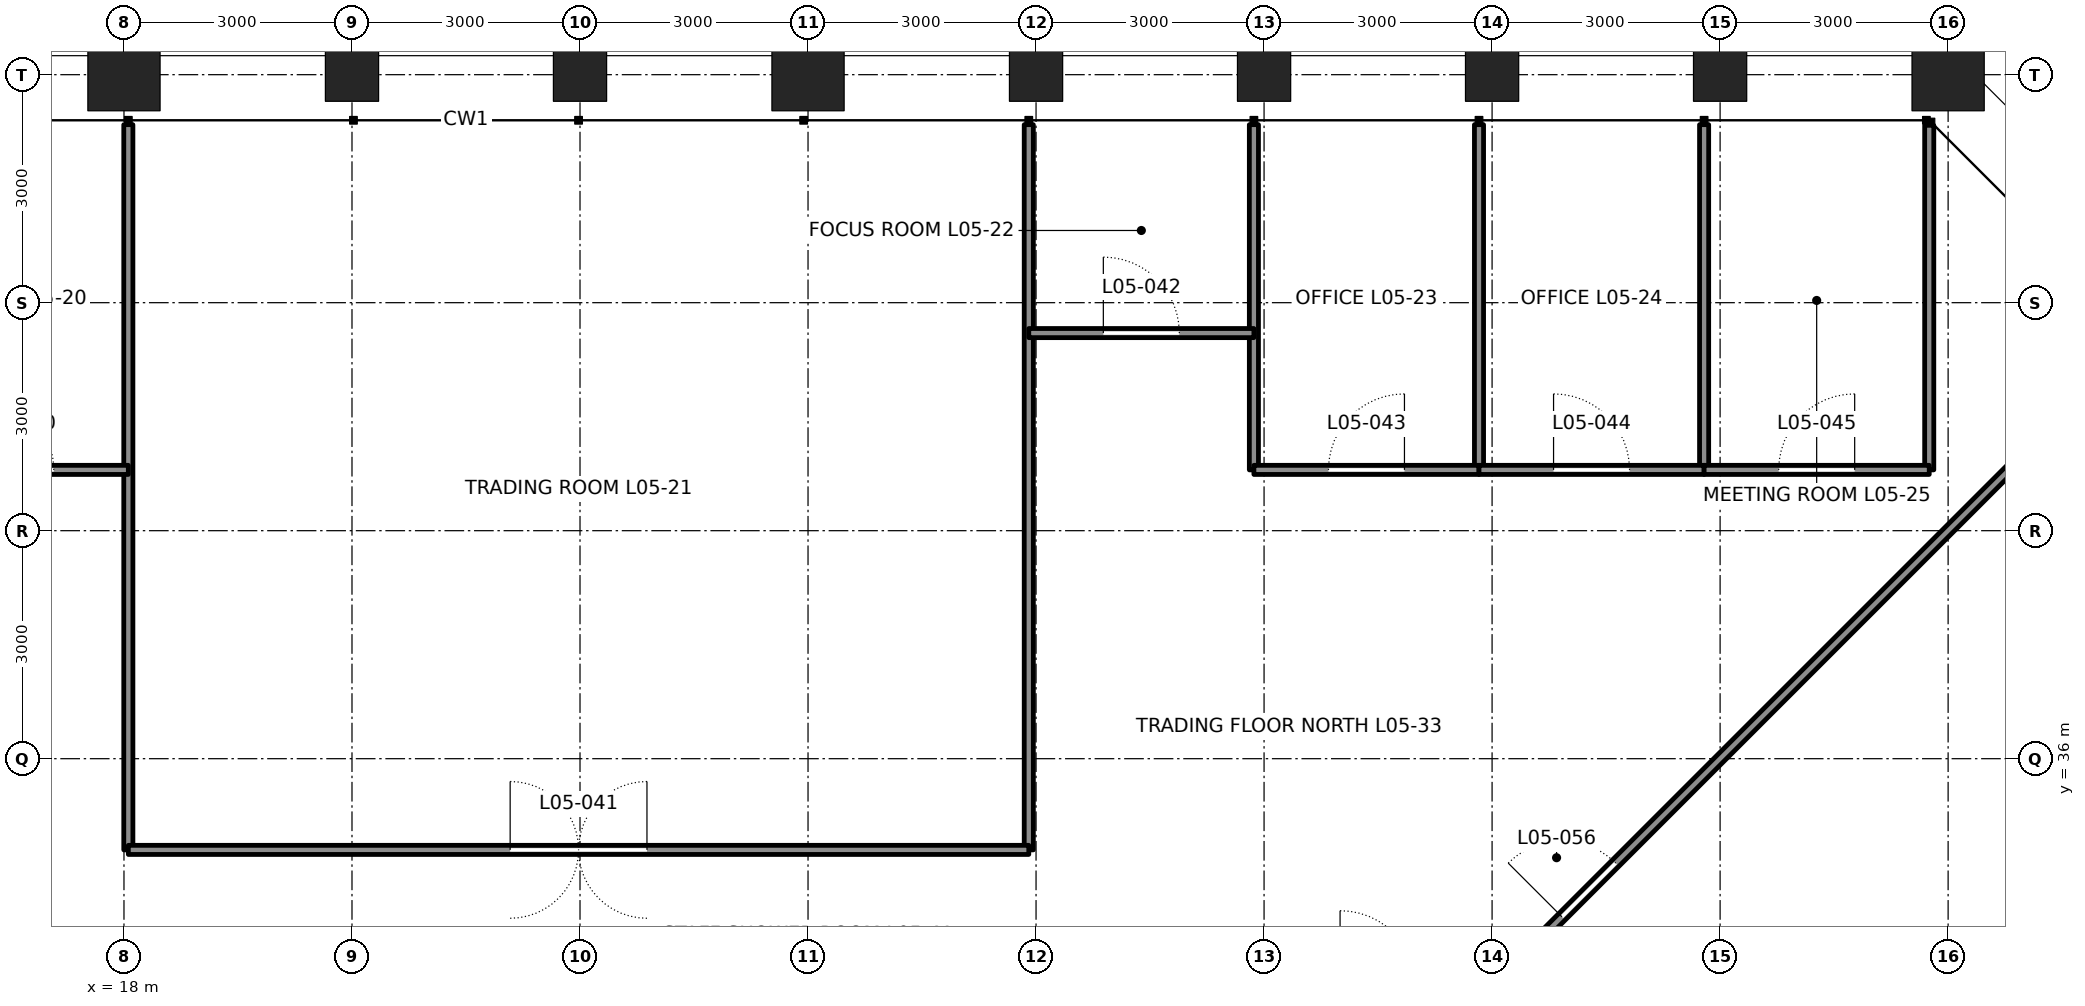
"""IFC4 building model, lengths in metres.
Left out: names, types, materials, properties, quantities, classifications, styles, units other than length and angle.
Written with IfcOpenShell. Run it as: python <this file> out.ifc"""

import sys

from ifc_helpers import new_model, si_unit, direction, frame, frame_2d, origin, origin_2d, place, context, subcontext, project, spatial, rectangle, hollow_rectangle, extrude, element, fill, save


model = new_model("IFC4")
c1 = context("Model", 3, precision=1e-05, world=origin(), true_north=direction((0.0, 1.0)))
c2 = subcontext(c1, "Body", "Model", "MODEL_VIEW")
j1 = project(units=[si_unit("LENGTHUNIT", "METRE"), si_unit("PLANEANGLEUNIT", "RADIAN")], contexts=[c1])
p1 = place(None, origin())
s1 = spatial("IfcSite", under=j1, at=p1, CompositionType="ELEMENT")
p2 = place(p1, origin())
s2 = spatial("IfcBuilding", under=s1, at=p2, CompositionType="ELEMENT")
p3 = place(p2, frame((0.0, 0.0, 28.8)))
s3 = spatial("IfcBuildingStorey", under=s2, at=p3, CompositionType="ELEMENT", Elevation=28.8)
p4 = place(p3, frame((42.0, 45.0, 0.0), z_axis=(0.0, 0.0, 1.0), x_axis=(0.0, 1.0, 0.0)))
e1 = element("IfcColumn", 1, at=p4, inside=s3, PredefinedType="COLUMN", context=c2, shape_type="SweptSolid", body=[
    extrude(hollow_rectangle(XDim=0.95, YDim=0.95, WallThickness=0.095, at=origin_2d()), origin(), (0.0, 0.0, 1.0), 4.5),
])
for number, where, z_axis, x_axis in (
    (2, (39.0, 45.0, 0.0), (0.0, 0.0, 1.0), (0.0, 1.0, 0.0)),
    (3, (36.0, 45.0, 0.0), (0.0, 0.0, 1.0), (0.0, 1.0, 0.0)),
    (4, (33.0, 45.0, 0.0), (0.0, 0.0, 1.0), (0.0, 1.0, 0.0)),
    (5, (30.0, 45.0, 0.0), (0.0, 0.0, 1.0), (0.0, 1.0, 0.0)),
):
    element("IfcColumn", number, at=place(p3, frame(where, z_axis=z_axis, x_axis=x_axis)), inside=s3, PredefinedType="COLUMN", context=c2, shape_type="SweptSolid", body=[
        extrude(hollow_rectangle(XDim=0.7, YDim=0.7, WallThickness=0.07, at=origin_2d()), origin(), (0.0, 0.0, 1.0), 4.5),
    ])
p5 = place(p3, frame((27.0, 45.0, 0.0), z_axis=(0.0, 0.0, 1.0), x_axis=(0.0, 1.0, 0.0)))
e6 = element("IfcColumn", 6, at=p5, inside=s3, PredefinedType="COLUMN", context=c2, shape_type="SweptSolid", body=[
    extrude(hollow_rectangle(XDim=0.95, YDim=0.95, WallThickness=0.11, at=origin_2d()), origin(), (0.0, 0.0, 1.0), 4.5),
])
for number, where, z_axis, x_axis in (
    (7, (24.0, 45.0, 0.0), (0.0, 0.0, 1.0), (0.0, 1.0, 0.0)),
    (8, (21.0, 45.0, 0.0), (0.0, 0.0, 1.0), (0.0, 1.0, 0.0)),
):
    element("IfcColumn", number, at=place(p3, frame(where, z_axis=z_axis, x_axis=x_axis)), inside=s3, PredefinedType="COLUMN", context=c2, shape_type="SweptSolid", body=[
        extrude(hollow_rectangle(XDim=0.7, YDim=0.7, WallThickness=0.07, at=origin_2d()), origin(), (0.0, 0.0, 1.0), 4.5),
    ])
p6 = place(p3, frame((18.0, 45.0, 0.0), z_axis=(0.0, 0.0, 1.0), x_axis=(0.0, 1.0, 0.0)))
e9 = element("IfcColumn", 9, at=p6, inside=s3, PredefinedType="COLUMN", context=c2, shape_type="SweptSolid", body=[
    extrude(hollow_rectangle(XDim=0.95, YDim=0.95, WallThickness=0.11, at=origin_2d()), origin(), (0.0, 0.0, 1.0), 4.5),
])
for number, where, z_axis, x_axis in (
    (10, (18.057, 44.343, -0.3), (0.0, 0.0, 1.0), (0.0, -1.0, 0.0)),
    (11, (29.904, 44.343, -0.3), (0.0, 0.0, 1.0), (0.0, -1.0, 0.0)),
):
    element("IfcWall", number, at=place(p3, frame(where, z_axis=z_axis, x_axis=x_axis)), inside=s3, PredefinedType="PARTITIONING", context=c2, shape_type="SweptSolid", body=[
        extrude(rectangle(XDim=9.542, YDim=0.12, at=frame_2d((4.771, 0.0))), origin(), (0.0, 0.0, 1.0), 3.646),
    ])
p7 = place(p3, frame((32.866, 44.343, -0.3), z_axis=(0.0, 0.0, 1.0), x_axis=(0.0, -1.0, 0.0)))
e12 = element("IfcWall", 12, at=p7, inside=s3, PredefinedType="PARTITIONING", context=c2, shape_type="SweptSolid", body=[
    extrude(rectangle(XDim=4.542, YDim=0.12, at=frame_2d((2.271, 0.0))), origin(), (0.0, 0.0, 1.0), 3.481),
])
for number, where, z_axis, x_axis in (
    (13, (35.828, 44.343, -0.3), (0.0, 0.0, 1.0), (0.0, -1.0, 0.0)),
    (14, (38.79, 44.343, -0.3), (0.0, 0.0, 1.0), (0.0, -1.0, 0.0)),
):
    element("IfcWall", number, at=place(p3, frame(where, z_axis=z_axis, x_axis=x_axis)), inside=s3, PredefinedType="PARTITIONING", context=c2, shape_type="SweptSolid", body=[
        extrude(rectangle(XDim=4.542, YDim=0.12, at=frame_2d((2.271, 0.0))), origin(), (0.0, 0.0, 1.0), 4.34),
    ])
p8 = place(p3, frame((41.751, 44.334, -0.3), z_axis=(0.0, 0.0, 1.0), x_axis=(0.0, -1.0, 0.0)))
e15 = element("IfcWall", 15, at=p8, inside=s3, PredefinedType="PARTITIONING", context=c2, shape_type="SweptSolid", body=[
    extrude(rectangle(XDim=4.534, YDim=0.12, at=frame_2d((2.267, 0.0))), origin(), (0.0, 0.0, 1.0), 4.34),
])
p9 = place(p3, frame((15.096, 39.8, -0.3), z_axis=(0.0, 0.0, 1.0), x_axis=(1.0, 0.0, 0.0)))
e16 = element("IfcWall", 16, at=p9, inside=s3, PredefinedType="PARTITIONING", context=c2, shape_type="SweptSolid", body=[
    extrude(rectangle(XDim=2.962, YDim=0.12, at=frame_2d((1.481, 0.0))), origin(), (0.0, 0.0, 1.0), 4.34),
])
p10 = place(p9, frame((0.981, 0.0, 0.3)))
e17 = element("IfcOpeningElement", 17, at=p10, cuts=e16, PredefinedType="OPENING", context=c2, shape_type="SweptSolid", body=[
    extrude(rectangle(XDim=1.0, YDim=2.4, at=frame_2d((0.5, 1.2))), frame((0.0, 0.07, 0.0), z_axis=(0.0, -1.0, 0.0), x_axis=(1.0, 0.0, 0.0)), (0.0, 0.0, 1.0), 0.14),
])
p11 = place(p3, frame((18.057, 34.8, -0.3), z_axis=(0.0, 0.0, 1.0), x_axis=(1.0, 0.0, 0.0)))
e18 = element("IfcWall", 18, at=p11, inside=s3, PredefinedType="PARTITIONING", context=c2, shape_type="SweptSolid", body=[
    extrude(rectangle(XDim=11.847, YDim=0.12, at=frame_2d((5.923, 0.0))), origin(), (0.0, 0.0, 1.0), 4.34),
])
p12 = place(p11, frame((5.023, 0.0, 0.3)))
e19 = element("IfcOpeningElement", 19, at=p12, cuts=e18, PredefinedType="OPENING", context=c2, shape_type="SweptSolid", body=[
    extrude(rectangle(XDim=1.8, YDim=2.4, at=frame_2d((0.9, 1.2))), frame((0.0, 0.07, 0.0), z_axis=(0.0, -1.0, 0.0), x_axis=(1.0, 0.0, 0.0)), (0.0, 0.0, 1.0), 0.14),
])
p13 = place(p3, frame((29.904, 41.6, -0.3), z_axis=(0.0, 0.0, 1.0), x_axis=(1.0, 0.0, 0.0)))
e20 = element("IfcWall", 20, at=p13, inside=s3, PredefinedType="PARTITIONING", context=c2, shape_type="SweptSolid", body=[
    extrude(rectangle(XDim=2.962, YDim=0.12, at=frame_2d((1.481, 0.0))), origin(), (0.0, 0.0, 1.0), 4.34),
])
p14 = place(p13, frame((0.981, 0.0, 0.3)))
e21 = element("IfcOpeningElement", 21, at=p14, cuts=e20, PredefinedType="OPENING", context=c2, shape_type="SweptSolid", body=[
    extrude(rectangle(XDim=1.0, YDim=2.4, at=frame_2d((0.5, 1.2))), frame((0.0, 0.07, 0.0), z_axis=(0.0, -1.0, 0.0), x_axis=(1.0, 0.0, 0.0)), (0.0, 0.0, 1.0), 0.14),
])
p15 = place(p3, frame((32.866, 39.8, -0.3), z_axis=(0.0, 0.0, 1.0), x_axis=(1.0, 0.0, 0.0)))
e22 = element("IfcWall", 22, at=p15, inside=s3, PredefinedType="PARTITIONING", context=c2, shape_type="SweptSolid", body=[
    extrude(rectangle(XDim=2.962, YDim=0.12, at=frame_2d((1.481, 0.0))), origin(), (0.0, 0.0, 1.0), 4.34),
])
p16 = place(p15, frame((0.981, 0.0, 0.3)))
e23 = element("IfcOpeningElement", 23, at=p16, cuts=e22, PredefinedType="OPENING", context=c2, shape_type="SweptSolid", body=[
    extrude(rectangle(XDim=1.0, YDim=2.4, at=frame_2d((0.5, 1.2))), frame((0.0, 0.07, 0.0), z_axis=(0.0, -1.0, 0.0), x_axis=(1.0, 0.0, 0.0)), (0.0, 0.0, 1.0), 0.14),
])
p17 = place(p3, frame((35.828, 39.8, -0.3), z_axis=(0.0, 0.0, 1.0), x_axis=(1.0, 0.0, 0.0)))
e24 = element("IfcWall", 24, at=p17, inside=s3, PredefinedType="PARTITIONING", context=c2, shape_type="SweptSolid", body=[
    extrude(rectangle(XDim=2.962, YDim=0.12, at=frame_2d((1.481, 0.0))), origin(), (0.0, 0.0, 1.0), 4.34),
])
p18 = place(p17, frame((0.981, 0.0, 0.3)))
e25 = element("IfcOpeningElement", 25, at=p18, cuts=e24, PredefinedType="OPENING", context=c2, shape_type="SweptSolid", body=[
    extrude(rectangle(XDim=1.0, YDim=2.4, at=frame_2d((0.5, 1.2))), frame((0.0, 0.07, 0.0), z_axis=(0.0, -1.0, 0.0), x_axis=(1.0, 0.0, 0.0)), (0.0, 0.0, 1.0), 0.14),
])
p19 = place(p3, frame((38.79, 39.8, -0.3), z_axis=(0.0, 0.0, 1.0), x_axis=(1.0, 0.0, 0.0)))
e26 = element("IfcWall", 26, at=p19, inside=s3, PredefinedType="PARTITIONING", context=c2, shape_type="SweptSolid", body=[
    extrude(rectangle(XDim=2.962, YDim=0.12, at=frame_2d((1.481, 0.0))), origin(), (0.0, 0.0, 1.0), 4.34),
])
p20 = place(p19, frame((0.981, 0.0, 0.3)))
e27 = element("IfcOpeningElement", 27, at=p20, cuts=e26, PredefinedType="OPENING", context=c2, shape_type="SweptSolid", body=[
    extrude(rectangle(XDim=1.0, YDim=2.4, at=frame_2d((0.5, 1.2))), frame((0.0, 0.07, 0.0), z_axis=(0.0, -1.0, 0.0), x_axis=(1.0, 0.0, 0.0)), (0.0, 0.0, 1.0), 0.14),
])
p21 = place(p3, frame((36.0, 33.0, -0.3), z_axis=(0.0, 0.0, 1.0), x_axis=(0.707106781187, 0.707106781187, 0.0)))
e28 = element("IfcWall", 28, at=p21, inside=s3, PredefinedType="PARTITIONING", context=c2, shape_type="SweptSolid", body=[
    extrude(rectangle(XDim=11.842, YDim=0.12, at=frame_2d((5.921, 0.0))), origin(), (0.0, 0.0, 1.0), 4.34),
])
p22 = place(p21, frame((1.3, 0.0, 0.3)))
e29 = element("IfcOpeningElement", 29, at=p22, cuts=e28, PredefinedType="OPENING", context=c2, shape_type="SweptSolid", body=[
    extrude(rectangle(XDim=1.0, YDim=2.4, at=frame_2d((0.5, 1.2))), frame((0.0, 0.07, 0.0), z_axis=(0.0, -1.0, 0.0), x_axis=(1.0, 0.0, 0.0)), (0.0, 0.0, 1.0), 0.14),
])
p23 = place(p10, origin())
e30 = element("IfcDoor", 30, at=p23, inside=s3, OperationType="SINGLE_SWING_LEFT", PredefinedType="DOOR", context=c2, shape_type="SweptSolid", body=[
    extrude(rectangle(XDim=1.0, YDim=2.4, at=frame_2d((0.5, 1.2))), frame((0.0, 0.025, 0.0), z_axis=(0.0, -1.0, 0.0), x_axis=(1.0, 0.0, 0.0)), (0.0, 0.0, 1.0), 0.05),
])
fill(e17, e30)
p24 = place(p12, origin())
e31 = element("IfcDoor", 31, at=p24, inside=s3, OperationType="DOUBLE_DOOR_DOUBLE_SWING", PredefinedType="DOOR", context=c2, shape_type="SweptSolid", body=[
    extrude(rectangle(XDim=1.8, YDim=2.4, at=frame_2d((0.9, 1.2))), frame((0.0, 0.025, 0.0), z_axis=(0.0, -1.0, 0.0), x_axis=(1.0, 0.0, 0.0)), (0.0, 0.0, 1.0), 0.05),
])
fill(e19, e31)
p25 = place(p14, origin())
e32 = element("IfcDoor", 32, at=p25, inside=s3, OperationType="SINGLE_SWING_LEFT", PredefinedType="DOOR", context=c2, shape_type="SweptSolid", body=[
    extrude(rectangle(XDim=1.0, YDim=2.4, at=frame_2d((0.5, 1.2))), frame((0.0, 0.025, 0.0), z_axis=(0.0, -1.0, 0.0), x_axis=(1.0, 0.0, 0.0)), (0.0, 0.0, 1.0), 0.05),
])
fill(e21, e32)
p26 = place(p16, origin())
e33 = element("IfcDoor", 33, at=p26, inside=s3, OperationType="SINGLE_SWING_RIGHT", PredefinedType="DOOR", context=c2, shape_type="SweptSolid", body=[
    extrude(rectangle(XDim=1.0, YDim=2.4, at=frame_2d((0.5, 1.2))), frame((0.0, 0.025, 0.0), z_axis=(0.0, -1.0, 0.0), x_axis=(1.0, 0.0, 0.0)), (0.0, 0.0, 1.0), 0.05),
])
fill(e23, e33)
p27 = place(p18, origin())
e34 = element("IfcDoor", 34, at=p27, inside=s3, OperationType="SINGLE_SWING_LEFT", PredefinedType="DOOR", context=c2, shape_type="SweptSolid", body=[
    extrude(rectangle(XDim=1.0, YDim=2.4, at=frame_2d((0.5, 1.2))), frame((0.0, 0.025, 0.0), z_axis=(0.0, -1.0, 0.0), x_axis=(1.0, 0.0, 0.0)), (0.0, 0.0, 1.0), 0.05),
])
fill(e25, e34)
p28 = place(p20, origin())
e35 = element("IfcDoor", 35, at=p28, inside=s3, OperationType="SINGLE_SWING_RIGHT", PredefinedType="DOOR", context=c2, shape_type="SweptSolid", body=[
    extrude(rectangle(XDim=1.0, YDim=2.4, at=frame_2d((0.5, 1.2))), frame((0.0, 0.025, 0.0), z_axis=(0.0, -1.0, 0.0), x_axis=(1.0, 0.0, 0.0)), (0.0, 0.0, 1.0), 0.05),
])
fill(e27, e35)
p29 = place(p22, origin())
e36 = element("IfcDoor", 36, at=p29, inside=s3, OperationType="SINGLE_SWING_LEFT", PredefinedType="DOOR", context=c2, shape_type="SweptSolid", body=[
    extrude(rectangle(XDim=1.0, YDim=2.4, at=frame_2d((0.5, 1.2))), frame((0.0, 0.025, 0.0), z_axis=(0.0, -1.0, 0.0), x_axis=(1.0, 0.0, 0.0)), (0.0, 0.0, 1.0), 0.05),
])
fill(e29, e36)
save(model, sys.argv[1])
